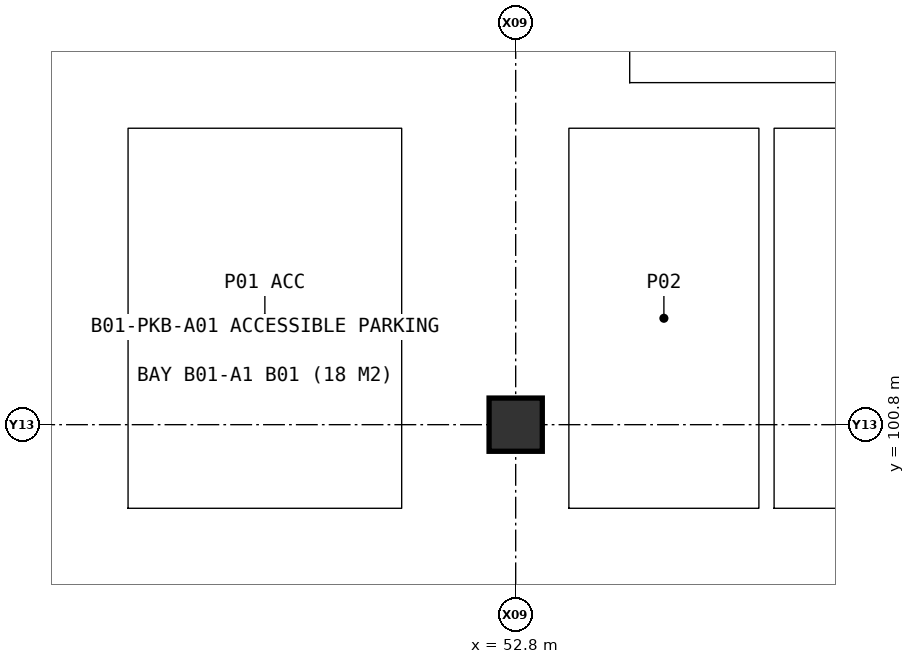
"""IFC4 building model, lengths in metres.
Left out: names, types, materials, properties, quantities, classifications, styles, units other than length and angle.
Written with IfcOpenShell. Run it as: python <this file> out.ifc"""

import sys

from ifc_helpers import new_model, si_unit, direction, frame, origin, origin_2d, place, context, subcontext, project, spatial, rectangle, extrude, element, save


model = new_model("IFC4")
c1 = context("Model", 3, precision=1e-05, world=origin(), true_north=direction((0.0, 1.0)))
c2 = subcontext(c1, "Body", "Model", "MODEL_VIEW")
j1 = project(units=[si_unit("LENGTHUNIT", "METRE"), si_unit("PLANEANGLEUNIT", "RADIAN")], contexts=[c1])
p1 = place(None, origin())
s1 = spatial("IfcSite", under=j1, at=p1, CompositionType="ELEMENT")
p2 = place(p1, origin())
s2 = spatial("IfcBuilding", under=s1, at=p2, CompositionType="ELEMENT")
p3 = place(p2, frame((0.0, 0.0, -4.5)))
s3 = spatial("IfcBuildingStorey", under=s2, at=p3, CompositionType="ELEMENT", Elevation=-4.5)
p4 = place(p3, frame((52.8, 100.8, 0.0), z_axis=(0.0, 0.0, 1.0), x_axis=(1.0, 0.0, 0.0)))
e1 = element("IfcColumn", 1, at=p4, inside=s3, PredefinedType="COLUMN", context=c2, shape_type="SweptSolid", body=[
    extrude(rectangle(XDim=0.7, YDim=0.7, at=origin_2d()), origin(), (0.0, 0.0, 1.0), 4.5),
])
save(model, sys.argv[1])
